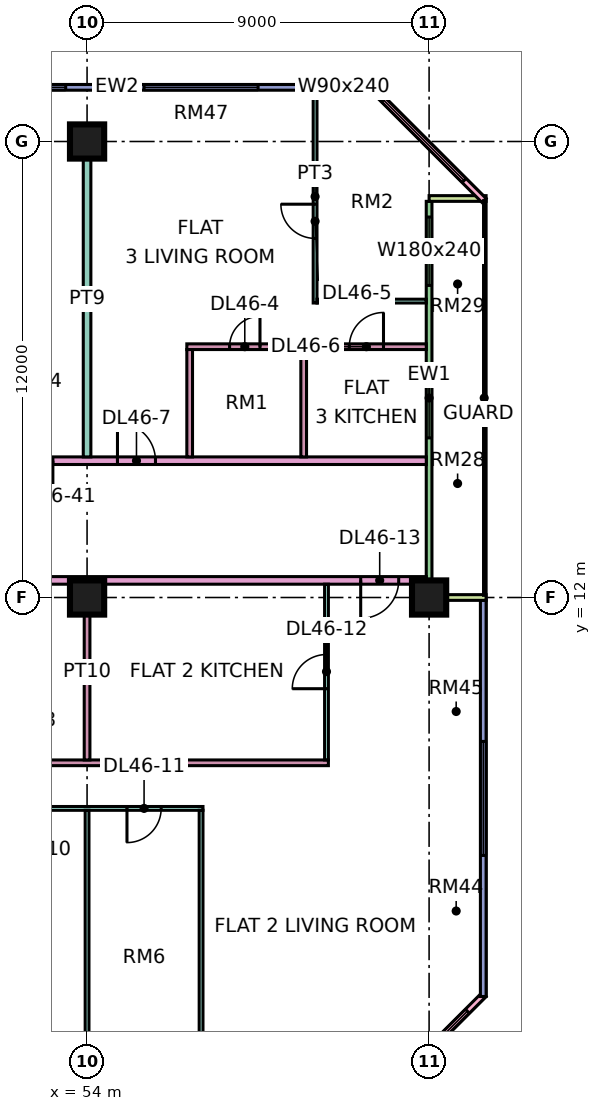
"""IFC4 building model, lengths in metres.
Left out: names, types, materials, properties, quantities, classifications, styles, units other than length and angle.
Written with IfcOpenShell. Run it as: python <this file> out.ifc"""

import sys

from ifc_helpers import new_model, si_unit, direction, frame, frame_2d, origin, origin_2d, place, context, subcontext, project, spatial, rectangle, extrude, element, fill, save


model = new_model("IFC4")
c1 = context("Model", 3, precision=1e-05, world=origin(), true_north=direction((0.0, 1.0)))
c2 = subcontext(c1, "Body", "Model", "MODEL_VIEW")
j1 = project(units=[si_unit("LENGTHUNIT", "METRE"), si_unit("PLANEANGLEUNIT", "RADIAN")], contexts=[c1])
p1 = place(None, origin())
s1 = spatial("IfcSite", under=j1, at=p1, CompositionType="ELEMENT")
p2 = place(p1, origin())
s2 = spatial("IfcBuilding", under=s1, at=p2, CompositionType="ELEMENT")
p3 = place(p2, frame((0.0, 0.0, 198.65)))
s3 = spatial("IfcBuildingStorey", under=s2, at=p3, CompositionType="ELEMENT", Elevation=198.65)
for number, where, z_axis, x_axis in (
    (1, (54.0, 12.0, 0.0), (0.0, 0.0, 1.0), (1.0, 0.0, 0.0)),
    (2, (54.0, 24.0, 0.0), (0.0, 0.0, 1.0), (1.0, 0.0, 0.0)),
    (3, (63.0, 12.0, 0.0), (0.0, 0.0, 1.0), (1.0, 0.0, 0.0)),
):
    element("IfcColumn", number, at=place(p3, frame(where, z_axis=z_axis, x_axis=x_axis)), inside=s3, PredefinedType="COLUMN", context=c2, shape_type="SweptSolid", body=[
        extrude(rectangle(XDim=0.9, YDim=0.9, at=origin_2d()), origin(), (0.0, 0.0, 1.0), 3.75),
    ])
p4 = place(p3, frame((61.5, 25.425, 0.0), z_axis=(0.0, 0.0, 1.0), x_axis=(-1.0, 0.0, 0.0)))
e4 = element("IfcWall", 4, at=p4, inside=s3, PredefinedType="SOLIDWALL", context=c2, shape_type="SweptSolid", body=[
    extrude(rectangle(XDim=13.425, YDim=0.15, at=frame_2d((6.712, 0.0))), origin(), (0.0, 0.0, 1.0), 3.35),
])
p5 = place(p4, frame((0.3, 0.0, 0.45)))
e5 = element("IfcOpeningElement", 5, at=p5, cuts=e4, PredefinedType="OPENING", context=c2, shape_type="SweptSolid", body=[
    extrude(rectangle(XDim=0.9, YDim=2.4, at=frame_2d((0.45, 1.2))), frame((0.0, 0.085, 0.0), z_axis=(0.0, -1.0, 0.0), x_axis=(1.0, 0.0, 0.0)), (0.0, 0.0, 1.0), 0.17),
])
p6 = place(p4, frame((3.0, 0.0, 0.45)))
e6 = element("IfcOpeningElement", 6, at=p6, cuts=e4, PredefinedType="OPENING", context=c2, shape_type="SweptSolid", body=[
    extrude(rectangle(XDim=3.0, YDim=2.4, at=frame_2d((1.5, 1.2))), frame((0.0, 0.085, 0.0), z_axis=(0.0, -1.0, 0.0), x_axis=(1.0, 0.0, 0.0)), (0.0, 0.0, 1.0), 0.17),
])
p7 = place(p4, frame((8.062, 0.0, 0.45)))
e7 = element("IfcOpeningElement", 7, at=p7, cuts=e4, PredefinedType="OPENING", context=c2, shape_type="SweptSolid", body=[
    extrude(rectangle(XDim=4.8, YDim=2.4, at=frame_2d((2.4, 1.2))), frame((0.0, 0.085, 0.0), z_axis=(0.0, -1.0, 0.0), x_axis=(1.0, 0.0, 0.0)), (0.0, 0.0, 1.0), 0.17),
])
p8 = place(p3, frame((61.447, -1.447, 0.0), z_axis=(0.0, 0.0, 1.0), x_axis=(0.707106781187, 0.707106781187, 0.0)))
e8 = element("IfcWall", 8, at=p8, inside=s3, PredefinedType="SOLIDWALL", context=c2, shape_type="SweptSolid", body=[
    extrude(rectangle(XDim=4.243, YDim=0.15, at=frame_2d((2.121, 0.0))), origin(), (0.0, 0.0, 1.0), 3.35),
])
p9 = place(p8, frame((0.621, 0.0, 0.45)))
e9 = element("IfcOpeningElement", 9, at=p9, cuts=e8, PredefinedType="OPENING", context=c2, shape_type="SweptSolid", body=[
    extrude(rectangle(XDim=3.0, YDim=2.4, at=frame_2d((1.5, 1.2))), frame((0.0, 0.085, 0.0), z_axis=(0.0, -1.0, 0.0), x_axis=(1.0, 0.0, 0.0)), (0.0, 0.0, 1.0), 0.17),
])
p10 = place(p3, frame((64.425, 1.5, 0.0), z_axis=(0.0, 0.0, 1.0), x_axis=(0.0, 1.0, 0.0)))
e10 = element("IfcWall", 10, at=p10, inside=s3, PredefinedType="SOLIDWALL", context=c2, shape_type="SweptSolid", body=[
    extrude(rectangle(XDim=10.425, YDim=0.15, at=frame_2d((5.212, 0.0))), origin(), (0.0, 0.0, 1.0), 3.35),
])
p11 = place(p10, frame((3.712, 0.0, 0.45)))
e11 = element("IfcOpeningElement", 11, at=p11, cuts=e10, PredefinedType="OPENING", context=c2, shape_type="SweptSolid", body=[
    extrude(rectangle(XDim=3.0, YDim=2.4, at=frame_2d((1.5, 1.2))), frame((0.0, 0.085, 0.0), z_axis=(0.0, -1.0, 0.0), x_axis=(1.0, 0.0, 0.0)), (0.0, 0.0, 1.0), 0.17),
])
p12 = place(p3, frame((63.0, 12.075, 0.0), z_axis=(0.0, 0.0, 1.0), x_axis=(0.0, 1.0, 0.0)))
e12 = element("IfcWall", 12, at=p12, inside=s3, PredefinedType="SOLIDWALL", context=c2, shape_type="SweptSolid", body=[
    extrude(rectangle(XDim=10.35, YDim=0.15, at=frame_2d((5.175, 0.0))), origin(), (0.0, 0.0, 1.0), 3.35),
])
p13 = place(p12, frame((4.125, 0.0, 0.45)))
e13 = element("IfcOpeningElement", 13, at=p13, cuts=e12, PredefinedType="OPENING", context=c2, shape_type="SweptSolid", body=[
    extrude(rectangle(XDim=1.8, YDim=2.4, at=frame_2d((0.9, 1.2))), frame((0.0, 0.085, 0.0), z_axis=(0.0, -1.0, 0.0), x_axis=(1.0, 0.0, 0.0)), (0.0, 0.0, 1.0), 0.17),
])
p14 = place(p12, frame((8.137, 0.0, 0.45)))
e14 = element("IfcOpeningElement", 14, at=p14, cuts=e12, PredefinedType="OPENING", context=c2, shape_type="SweptSolid", body=[
    extrude(rectangle(XDim=1.8, YDim=2.4, at=frame_2d((0.9, 1.2))), frame((0.0, 0.085, 0.0), z_axis=(0.0, -1.0, 0.0), x_axis=(1.0, 0.0, 0.0)), (0.0, 0.0, 1.0), 0.17),
])
for number, where, z_axis, x_axis in (
    (15, (64.5, 12.0, 0.0), (0.0, 0.0, 1.0), (-1.0, 0.0, 0.0)),
    (16, (64.5, 22.5, 0.0), (0.0, 0.0, 1.0), (-1.0, 0.0, 0.0)),
):
    element("IfcWall", number, at=place(p3, frame(where, z_axis=z_axis, x_axis=x_axis)), inside=s3, PredefinedType="SOLIDWALL", context=c2, shape_type="SweptSolid", body=[
        extrude(rectangle(XDim=1.5, YDim=0.15, at=frame_2d((0.75, 0.0))), origin(), (0.0, 0.0, 1.0), 3.35),
    ])
p15 = place(p3, frame((64.447, 22.447, 0.0), z_axis=(0.0, 0.0, 1.0), x_axis=(-0.707106781187, 0.707106781187, 0.0)))
e17 = element("IfcWall", 17, at=p15, inside=s3, PredefinedType="SOLIDWALL", context=c2, shape_type="SweptSolid", body=[
    extrude(rectangle(XDim=4.243, YDim=0.15, at=frame_2d((2.121, 0.0))), origin(), (0.0, 0.0, 1.0), 3.35),
])
p16 = place(p15, frame((0.744, 0.0, 0.45)))
e18 = element("IfcOpeningElement", 18, at=p16, cuts=e17, PredefinedType="OPENING", context=c2, shape_type="SweptSolid", body=[
    extrude(rectangle(XDim=3.0, YDim=2.4, at=frame_2d((1.5, 1.2))), frame((0.0, 0.085, 0.0), z_axis=(0.0, -1.0, 0.0), x_axis=(1.0, 0.0, 0.0)), (0.0, 0.0, 1.0), 0.17),
])
p17 = place(p3, frame((40.65, 12.45, 0.0), z_axis=(0.0, 0.0, 1.0), x_axis=(1.0, 0.0, 0.0)))
e19 = element("IfcWall", 19, at=p17, inside=s3, PredefinedType="PARTITIONING", context=c2, shape_type="SweptSolid", body=[
    extrude(rectangle(XDim=22.276, YDim=0.2, at=frame_2d((11.138, 0.0))), origin(), (0.0, 0.0, 1.0), 3.35),
])
p18 = place(p17, frame((20.55, 0.0, 0.0)))
e20 = element("IfcOpeningElement", 20, at=p18, cuts=e19, PredefinedType="OPENING", context=c2, shape_type="SweptSolid", body=[
    extrude(rectangle(XDim=1.0, YDim=2.1, at=frame_2d((0.5, 1.05))), frame((0.0, 0.11, 0.0), z_axis=(0.0, -1.0, 0.0), x_axis=(1.0, 0.0, 0.0)), (0.0, 0.0, 1.0), 0.22),
])
p19 = place(p17, frame((1.05, 0.0, 0.0)))
e21 = element("IfcOpeningElement", 21, at=p19, cuts=e19, PredefinedType="OPENING", context=c2, shape_type="SweptSolid", body=[
    extrude(rectangle(XDim=1.0, YDim=2.1, at=frame_2d((0.5, 1.05))), frame((0.0, 0.11, 0.0), z_axis=(0.0, -1.0, 0.0), x_axis=(1.0, 0.0, 0.0)), (0.0, 0.0, 1.0), 0.22),
])
p20 = place(p3, frame((48.1, 6.45, 0.0), z_axis=(0.0, 0.0, 1.0), x_axis=(1.0, 0.0, 0.0)))
e22 = element("IfcWall", 22, at=p20, inside=s3, PredefinedType="PARTITIONING", context=c2, shape_type="SweptSolid", body=[
    extrude(rectangle(XDim=8.95, YDim=0.1, at=frame_2d((4.475, 0.0))), origin(), (0.0, 0.0, 1.0), 3.35),
])
p21 = place(p20, frame((0.95, 0.0, 0.0)))
e23 = element("IfcOpeningElement", 23, at=p21, cuts=e22, PredefinedType="OPENING", context=c2, shape_type="SweptSolid", body=[
    extrude(rectangle(XDim=0.9, YDim=2.1, at=frame_2d((0.45, 1.05))), frame((0.0, 0.06, 0.0), z_axis=(0.0, -1.0, 0.0), x_axis=(1.0, 0.0, 0.0)), (0.0, 0.0, 1.0), 0.12),
])
p22 = place(p20, frame((3.95, 0.0, 0.0)))
e24 = element("IfcOpeningElement", 24, at=p22, cuts=e22, PredefinedType="OPENING", context=c2, shape_type="SweptSolid", body=[
    extrude(rectangle(XDim=0.9, YDim=2.1, at=frame_2d((0.45, 1.05))), frame((0.0, 0.06, 0.0), z_axis=(0.0, -1.0, 0.0), x_axis=(1.0, 0.0, 0.0)), (0.0, 0.0, 1.0), 0.12),
])
p23 = place(p20, frame((6.95, 0.0, 0.0)))
e25 = element("IfcOpeningElement", 25, at=p23, cuts=e22, PredefinedType="OPENING", context=c2, shape_type="SweptSolid", body=[
    extrude(rectangle(XDim=0.9, YDim=2.1, at=frame_2d((0.45, 1.05))), frame((0.0, 0.06, 0.0), z_axis=(0.0, -1.0, 0.0), x_axis=(1.0, 0.0, 0.0)), (0.0, 0.0, 1.0), 0.12),
])
p24 = place(p3, frame((48.1, 7.65, 0.0), z_axis=(0.0, 0.0, 1.0), x_axis=(1.0, 0.0, 0.0)))
e26 = element("IfcWall", 26, at=p24, inside=s3, PredefinedType="PARTITIONING", context=c2, shape_type="SweptSolid", body=[
    extrude(rectangle(XDim=12.25, YDim=0.15, at=frame_2d((6.125, 0.0))), origin(), (0.0, 0.0, 1.0), 3.35),
])
p25 = place(p24, frame((3.75, 0.0, 0.0)))
e27 = element("IfcOpeningElement", 27, at=p25, cuts=e26, PredefinedType="OPENING", context=c2, shape_type="SweptSolid", body=[
    extrude(rectangle(XDim=0.8, YDim=2.1, at=frame_2d((0.4, 1.05))), frame((0.0, 0.085, 0.0), z_axis=(0.0, -1.0, 0.0), x_axis=(1.0, 0.0, 0.0)), (0.0, 0.0, 1.0), 0.17),
])
p26 = place(p24, frame((0.65, 0.0, 0.0)))
e28 = element("IfcOpeningElement", 28, at=p26, cuts=e26, PredefinedType="OPENING", context=c2, shape_type="SweptSolid", body=[
    extrude(rectangle(XDim=0.9, YDim=2.1, at=frame_2d((0.45, 1.05))), frame((0.0, 0.085, 0.0), z_axis=(0.0, -1.0, 0.0), x_axis=(1.0, 0.0, 0.0)), (0.0, 0.0, 1.0), 0.17),
])
p27 = place(p3, frame((51.225, 15.6, 0.0), z_axis=(0.0, 0.0, 1.0), x_axis=(1.0, 0.0, 0.0)))
e29 = element("IfcWall", 29, at=p27, inside=s3, PredefinedType="PARTITIONING", context=c2, shape_type="SweptSolid", body=[
    extrude(rectangle(XDim=11.701, YDim=0.2, at=frame_2d((5.851, 0.0))), origin(), (0.0, 0.0, 1.0), 3.35),
])
p28 = place(p27, frame((3.575, 0.0, 0.0)))
e30 = element("IfcOpeningElement", 30, at=p28, cuts=e29, PredefinedType="OPENING", context=c2, shape_type="SweptSolid", body=[
    extrude(rectangle(XDim=1.0, YDim=2.1, at=frame_2d((0.5, 1.05))), frame((0.0, 0.11, 0.0), z_axis=(0.0, -1.0, 0.0), x_axis=(1.0, 0.0, 0.0)), (0.0, 0.0, 1.0), 0.22),
])
p29 = place(p27, frame((0.875, 0.0, 0.0)))
e31 = element("IfcOpeningElement", 31, at=p29, cuts=e29, PredefinedType="OPENING", context=c2, shape_type="SweptSolid", body=[
    extrude(rectangle(XDim=1.0, YDim=2.1, at=frame_2d((0.5, 1.05))), frame((0.0, 0.11, 0.0), z_axis=(0.0, -1.0, 0.0), x_axis=(1.0, 0.0, 0.0)), (0.0, 0.0, 1.0), 0.22),
])
p30 = place(p3, frame((54.0, -1.351, 0.0), z_axis=(0.0, 0.0, 1.0), x_axis=(0.0, 1.0, 0.0)))
e32 = element("IfcWall", 32, at=p30, inside=s3, PredefinedType="PARTITIONING", context=c2, shape_type="SweptSolid", body=[
    extrude(rectangle(XDim=7.751, YDim=0.1, at=frame_2d((3.875, 0.0))), origin(), (0.0, 0.0, 1.0), 3.35),
])
p31 = place(p3, frame((54.0, 7.725, 0.0), z_axis=(0.0, 0.0, 1.0), x_axis=(0.0, 1.0, 0.0)))
e33 = element("IfcWall", 33, at=p31, inside=s3, PredefinedType="PARTITIONING", context=c2, shape_type="SweptSolid", body=[
    extrude(rectangle(XDim=4.625, YDim=0.15, at=frame_2d((2.312, 0.0))), origin(), (0.0, 0.0, 1.0), 3.35),
])
p32 = place(p3, frame((54.0, 15.7, 0.0), z_axis=(0.0, 0.0, 1.0), x_axis=(0.0, 1.0, 0.0)))
e34 = element("IfcWall", 34, at=p32, inside=s3, PredefinedType="PARTITIONING", context=c2, shape_type="SweptSolid", body=[
    extrude(rectangle(XDim=8.3, YDim=0.2, at=frame_2d((4.15, 0.0))), origin(), (0.0, 0.0, 1.0), 3.35),
])
p33 = place(p3, frame((56.625, 18.6, 0.0), z_axis=(0.0, 0.0, 1.0), x_axis=(1.0, 0.0, 0.0)))
e35 = element("IfcWall", 35, at=p33, inside=s3, PredefinedType="PARTITIONING", context=c2, shape_type="SweptSolid", body=[
    extrude(rectangle(XDim=6.301, YDim=0.15, at=frame_2d((3.15, 0.0))), origin(), (0.0, 0.0, 1.0), 3.35),
])
p34 = place(p33, frame((1.125, 0.0, 0.0)))
e36 = element("IfcOpeningElement", 36, at=p34, cuts=e35, PredefinedType="OPENING", context=c2, shape_type="SweptSolid", body=[
    extrude(rectangle(XDim=0.8, YDim=2.1, at=frame_2d((0.4, 1.05))), frame((0.0, 0.085, 0.0), z_axis=(0.0, -1.0, 0.0), x_axis=(1.0, 0.0, 0.0)), (0.0, 0.0, 1.0), 0.17),
])
p35 = place(p33, frame((4.275, 0.0, 0.0)))
e37 = element("IfcOpeningElement", 37, at=p35, cuts=e35, PredefinedType="OPENING", context=c2, shape_type="SweptSolid", body=[
    extrude(rectangle(XDim=0.9, YDim=2.1, at=frame_2d((0.45, 1.05))), frame((0.0, 0.085, 0.0), z_axis=(0.0, -1.0, 0.0), x_axis=(1.0, 0.0, 0.0)), (0.0, 0.0, 1.0), 0.17),
])
p36 = place(p3, frame((56.7, 15.7, 0.0), z_axis=(0.0, 0.0, 1.0), x_axis=(0.0, 1.0, 0.0)))
e38 = element("IfcWall", 38, at=p36, inside=s3, PredefinedType="PARTITIONING", context=c2, shape_type="SweptSolid", body=[
    extrude(rectangle(XDim=2.825, YDim=0.15, at=frame_2d((1.413, 0.0))), origin(), (0.0, 0.0, 1.0), 3.35),
])
p37 = place(p3, frame((57.0, -1.35, 0.0), z_axis=(0.0, 0.0, 1.0), x_axis=(0.0, 1.0, 0.0)))
e39 = element("IfcWall", 39, at=p37, inside=s3, PredefinedType="PARTITIONING", context=c2, shape_type="SweptSolid", body=[
    extrude(rectangle(XDim=7.75, YDim=0.1, at=frame_2d((3.875, 0.0))), origin(), (0.0, 0.0, 1.0), 3.35),
])
p38 = place(p3, frame((59.7, 15.7, 0.0), z_axis=(0.0, 0.0, 1.0), x_axis=(0.0, 1.0, 0.0)))
e40 = element("IfcWall", 40, at=p38, inside=s3, PredefinedType="PARTITIONING", context=c2, shape_type="SweptSolid", body=[
    extrude(rectangle(XDim=2.825, YDim=0.15, at=frame_2d((1.413, 0.0))), origin(), (0.0, 0.0, 1.0), 3.35),
])
p39 = place(p3, frame((60.0, 19.75, 0.0), z_axis=(0.0, 0.0, 1.0), x_axis=(0.0, 1.0, 0.0)))
e41 = element("IfcWall", 41, at=p39, inside=s3, PredefinedType="PARTITIONING", context=c2, shape_type="SweptSolid", body=[
    extrude(rectangle(XDim=5.6, YDim=0.1, at=frame_2d((2.8, 0.0))), origin(), (0.0, 0.0, 1.0), 3.35),
])
p40 = place(p39, frame((1.7, 0.0, 0.0)))
e42 = element("IfcOpeningElement", 42, at=p40, cuts=e41, PredefinedType="OPENING", context=c2, shape_type="SweptSolid", body=[
    extrude(rectangle(XDim=0.9, YDim=2.1, at=frame_2d((0.45, 1.05))), frame((0.0, 0.06, 0.0), z_axis=(0.0, -1.0, 0.0), x_axis=(1.0, 0.0, 0.0)), (0.0, 0.0, 1.0), 0.12),
])
p41 = place(p3, frame((60.05, 19.8, 0.0), z_axis=(0.0, 0.0, 1.0), x_axis=(1.0, 0.0, 0.0)))
e43 = element("IfcWall", 43, at=p41, inside=s3, PredefinedType="PARTITIONING", context=c2, shape_type="SweptSolid", body=[
    extrude(rectangle(XDim=2.876, YDim=0.1, at=frame_2d((1.438, 0.0))), origin(), (0.0, 0.0, 1.0), 3.35),
])
p42 = place(p3, frame((60.3, 7.725, 0.0), z_axis=(0.0, 0.0, 1.0), x_axis=(0.0, 1.0, 0.0)))
e44 = element("IfcWall", 44, at=p42, inside=s3, PredefinedType="PARTITIONING", context=c2, shape_type="SweptSolid", body=[
    extrude(rectangle(XDim=4.625, YDim=0.1, at=frame_2d((2.312, 0.0))), origin(), (0.0, 0.0, 1.0), 3.35),
])
p43 = place(p42, frame((1.875, 0.0, 0.0)))
e45 = element("IfcOpeningElement", 45, at=p43, cuts=e44, PredefinedType="OPENING", context=c2, shape_type="SweptSolid", body=[
    extrude(rectangle(XDim=0.9, YDim=2.1, at=frame_2d((0.45, 1.05))), frame((0.0, 0.06, 0.0), z_axis=(0.0, -1.0, 0.0), x_axis=(1.0, 0.0, 0.0)), (0.0, 0.0, 1.0), 0.12),
])
p44 = place(p5, origin())
e46 = element("IfcWindow", 46, at=p44, inside=s3, PartitioningType="SINGLE_PANEL", PredefinedType="WINDOW", context=c2, shape_type="SweptSolid", body=[
    extrude(rectangle(XDim=0.9, YDim=2.4, at=frame_2d((0.45, 1.2))), frame((0.0, 0.03, 0.0), z_axis=(0.0, -1.0, 0.0), x_axis=(1.0, 0.0, 0.0)), (0.0, 0.0, 1.0), 0.06),
])
fill(e5, e46)
p45 = place(p6, origin())
e47 = element("IfcWindow", 47, at=p45, inside=s3, PartitioningType="SINGLE_PANEL", PredefinedType="WINDOW", context=c2, shape_type="SweptSolid", body=[
    extrude(rectangle(XDim=3.0, YDim=2.4, at=frame_2d((1.5, 1.2))), frame((0.0, 0.03, 0.0), z_axis=(0.0, -1.0, 0.0), x_axis=(1.0, 0.0, 0.0)), (0.0, 0.0, 1.0), 0.06),
])
fill(e6, e47)
p46 = place(p7, origin())
e48 = element("IfcWindow", 48, at=p46, inside=s3, PartitioningType="SINGLE_PANEL", PredefinedType="WINDOW", context=c2, shape_type="SweptSolid", body=[
    extrude(rectangle(XDim=4.8, YDim=2.4, at=frame_2d((2.4, 1.2))), frame((0.0, 0.03, 0.0), z_axis=(0.0, -1.0, 0.0), x_axis=(1.0, 0.0, 0.0)), (0.0, 0.0, 1.0), 0.06),
])
fill(e7, e48)
p47 = place(p9, origin())
e49 = element("IfcWindow", 49, at=p47, inside=s3, PartitioningType="SINGLE_PANEL", PredefinedType="WINDOW", context=c2, shape_type="SweptSolid", body=[
    extrude(rectangle(XDim=3.0, YDim=2.4, at=frame_2d((1.5, 1.2))), frame((0.0, 0.03, 0.0), z_axis=(0.0, -1.0, 0.0), x_axis=(1.0, 0.0, 0.0)), (0.0, 0.0, 1.0), 0.06),
])
fill(e9, e49)
p48 = place(p11, origin())
e50 = element("IfcWindow", 50, at=p48, inside=s3, PartitioningType="SINGLE_PANEL", PredefinedType="WINDOW", context=c2, shape_type="SweptSolid", body=[
    extrude(rectangle(XDim=3.0, YDim=2.4, at=frame_2d((1.5, 1.2))), frame((0.0, 0.03, 0.0), z_axis=(0.0, -1.0, 0.0), x_axis=(1.0, 0.0, 0.0)), (0.0, 0.0, 1.0), 0.06),
])
fill(e11, e50)
p49 = place(p13, origin())
e51 = element("IfcWindow", 51, at=p49, inside=s3, PartitioningType="SINGLE_PANEL", PredefinedType="WINDOW", context=c2, shape_type="SweptSolid", body=[
    extrude(rectangle(XDim=1.8, YDim=2.4, at=frame_2d((0.9, 1.2))), frame((0.0, 0.03, 0.0), z_axis=(0.0, -1.0, 0.0), x_axis=(1.0, 0.0, 0.0)), (0.0, 0.0, 1.0), 0.06),
])
fill(e13, e51)
p50 = place(p14, origin())
e52 = element("IfcWindow", 52, at=p50, inside=s3, PartitioningType="SINGLE_PANEL", PredefinedType="WINDOW", context=c2, shape_type="SweptSolid", body=[
    extrude(rectangle(XDim=1.8, YDim=2.4, at=frame_2d((0.9, 1.2))), frame((0.0, 0.03, 0.0), z_axis=(0.0, -1.0, 0.0), x_axis=(1.0, 0.0, 0.0)), (0.0, 0.0, 1.0), 0.06),
])
fill(e14, e52)
p51 = place(p16, origin())
e53 = element("IfcWindow", 53, at=p51, inside=s3, PartitioningType="SINGLE_PANEL", PredefinedType="WINDOW", context=c2, shape_type="SweptSolid", body=[
    extrude(rectangle(XDim=3.0, YDim=2.4, at=frame_2d((1.5, 1.2))), frame((0.0, 0.03, 0.0), z_axis=(0.0, -1.0, 0.0), x_axis=(1.0, 0.0, 0.0)), (0.0, 0.0, 1.0), 0.06),
])
fill(e18, e53)
p52 = place(p34, frame((0.8, 0.0, 0.0), z_axis=(0.0, 0.0, 1.0), x_axis=(-1.0, 0.0, 0.0)))
e54 = element("IfcDoor", 54, at=p52, inside=s3, OperationType="SINGLE_SWING_RIGHT", PredefinedType="DOOR", context=c2, shape_type="SweptSolid", body=[
    extrude(rectangle(XDim=0.8, YDim=2.1, at=frame_2d((0.4, 1.05))), frame((0.0, 0.025, 0.0), z_axis=(0.0, -1.0, 0.0), x_axis=(1.0, 0.0, 0.0)), (0.0, 0.0, 1.0), 0.05),
])
fill(e36, e54)
p53 = place(p40, frame((0.9, 0.0, 0.0), z_axis=(0.0, 0.0, 1.0), x_axis=(-1.0, 0.0, 0.0)))
e55 = element("IfcDoor", 55, at=p53, inside=s3, OperationType="SINGLE_SWING_RIGHT", PredefinedType="DOOR", context=c2, shape_type="SweptSolid", body=[
    extrude(rectangle(XDim=0.9, YDim=2.1, at=frame_2d((0.45, 1.05))), frame((0.0, 0.025, 0.0), z_axis=(0.0, -1.0, 0.0), x_axis=(1.0, 0.0, 0.0)), (0.0, 0.0, 1.0), 0.05),
])
fill(e42, e55)
p54 = place(p35, frame((0.9, 0.0, 0.0), z_axis=(0.0, 0.0, 1.0), x_axis=(-1.0, 0.0, 0.0)))
e56 = element("IfcDoor", 56, at=p54, inside=s3, OperationType="SINGLE_SWING_RIGHT", PredefinedType="DOOR", context=c2, shape_type="SweptSolid", body=[
    extrude(rectangle(XDim=0.9, YDim=2.1, at=frame_2d((0.45, 1.05))), frame((0.0, 0.025, 0.0), z_axis=(0.0, -1.0, 0.0), x_axis=(1.0, 0.0, 0.0)), (0.0, 0.0, 1.0), 0.05),
])
fill(e37, e56)
p55 = place(p28, origin())
e57 = element("IfcDoor", 57, at=p55, inside=s3, OperationType="SINGLE_SWING_LEFT", PredefinedType="DOOR", context=c2, shape_type="SweptSolid", body=[
    extrude(rectangle(XDim=1.0, YDim=2.1, at=frame_2d((0.5, 1.05))), frame((0.0, 0.025, 0.0), z_axis=(0.0, -1.0, 0.0), x_axis=(1.0, 0.0, 0.0)), (0.0, 0.0, 1.0), 0.05),
])
fill(e30, e57)
p56 = place(p23, frame((0.9, 0.0, 0.0), z_axis=(0.0, 0.0, 1.0), x_axis=(-1.0, 0.0, 0.0)))
e58 = element("IfcDoor", 58, at=p56, inside=s3, OperationType="SINGLE_SWING_LEFT", PredefinedType="DOOR", context=c2, shape_type="SweptSolid", body=[
    extrude(rectangle(XDim=0.9, YDim=2.1, at=frame_2d((0.45, 1.05))), frame((0.0, 0.025, 0.0), z_axis=(0.0, -1.0, 0.0), x_axis=(1.0, 0.0, 0.0)), (0.0, 0.0, 1.0), 0.05),
])
fill(e25, e58)
p57 = place(p43, origin())
e59 = element("IfcDoor", 59, at=p57, inside=s3, OperationType="SINGLE_SWING_LEFT", PredefinedType="DOOR", context=c2, shape_type="SweptSolid", body=[
    extrude(rectangle(XDim=0.9, YDim=2.1, at=frame_2d((0.45, 1.05))), frame((0.0, 0.025, 0.0), z_axis=(0.0, -1.0, 0.0), x_axis=(1.0, 0.0, 0.0)), (0.0, 0.0, 1.0), 0.05),
])
fill(e45, e59)
p58 = place(p18, frame((1.0, 0.0, 0.0), z_axis=(0.0, 0.0, 1.0), x_axis=(-1.0, 0.0, 0.0)))
e60 = element("IfcDoor", 60, at=p58, inside=s3, OperationType="SINGLE_SWING_LEFT", PredefinedType="DOOR", context=c2, shape_type="SweptSolid", body=[
    extrude(rectangle(XDim=1.0, YDim=2.1, at=frame_2d((0.5, 1.05))), frame((0.0, 0.025, 0.0), z_axis=(0.0, -1.0, 0.0), x_axis=(1.0, 0.0, 0.0)), (0.0, 0.0, 1.0), 0.05),
])
fill(e20, e60)
p59 = place(p29, origin())
e61 = element("IfcDoor", 61, at=p59, inside=s3, OperationType="SINGLE_SWING_RIGHT", PredefinedType="DOOR", context=c2, shape_type="SweptSolid", body=[
    extrude(rectangle(XDim=1.0, YDim=2.1, at=frame_2d((0.5, 1.05))), frame((0.0, 0.025, 0.0), z_axis=(0.0, -1.0, 0.0), x_axis=(1.0, 0.0, 0.0)), (0.0, 0.0, 1.0), 0.05),
])
fill(e31, e61)
save(model, sys.argv[1])
